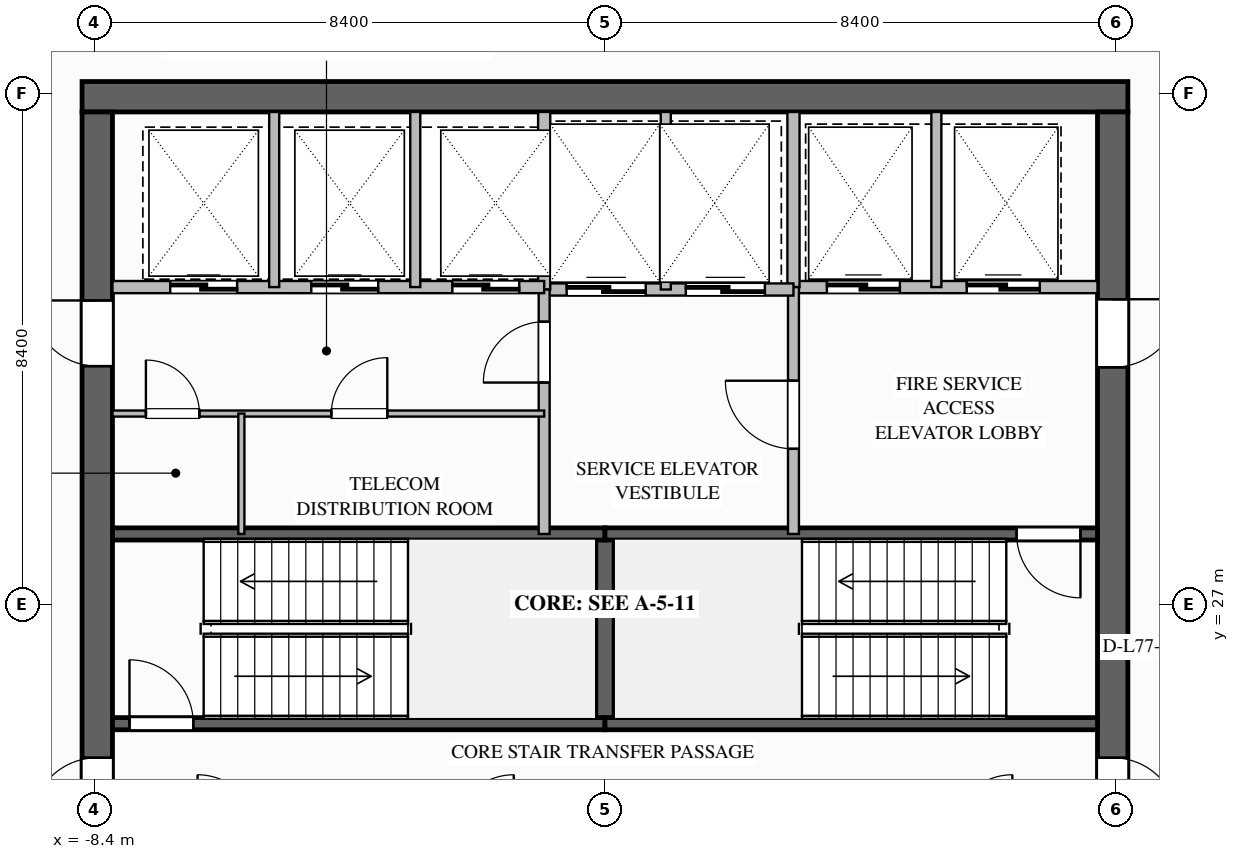
"""IFC4 building model, lengths in metres.
Left out: names, types, materials, properties, quantities, classifications, styles, units other than length and angle.
Written with IfcOpenShell. Run it as: python <this file> out.ifc"""

import sys

from ifc_helpers import new_model, si_unit, direction, frame, frame_2d, origin, place, context, subcontext, project, spatial, rectangle, extrude, element, fill, save


model = new_model("IFC4")
c1 = context("Model", 3, precision=1e-05, world=origin(), true_north=direction((0.0, 1.0)))
c2 = subcontext(c1, "Body", "Model", "MODEL_VIEW")
j1 = project(units=[si_unit("LENGTHUNIT", "METRE"), si_unit("PLANEANGLEUNIT", "RADIAN")], contexts=[c1])
p1 = place(None, origin())
s1 = spatial("IfcSite", under=j1, at=p1, CompositionType="ELEMENT")
p2 = place(p1, origin())
s2 = spatial("IfcBuilding", under=s1, at=p2, CompositionType="ELEMENT")
p3 = place(p2, frame((0.0, 0.0, 294.2)))
s3 = spatial("IfcBuildingStorey", under=s2, at=p3, CompositionType="ELEMENT", Elevation=294.2)
p4 = place(p3, frame((-8.6, 35.35, 0.0), z_axis=(0.0, 0.0, 1.0), x_axis=(1.0, 0.0, 0.0)))
e1 = element("IfcWall", 1, at=p4, inside=s3, PredefinedType="SHEAR", context=c2, shape_type="SweptSolid", body=[
    extrude(rectangle(XDim=17.2, YDim=0.5, at=frame_2d((8.6, 0.0))), origin(), (0.0, 0.0, 1.0), 4.4),
])
p5 = place(p3, frame((8.35, 35.1, 0.0), z_axis=(0.0, 0.0, 1.0), x_axis=(0.0, -1.0, 0.0)))
e2 = element("IfcWall", 2, at=p5, inside=s3, PredefinedType="SHEAR", context=c2, shape_type="SweptSolid", body=[
    extrude(rectangle(XDim=16.2, YDim=0.5, at=frame_2d((8.1, 0.0))), origin(), (0.0, 0.0, 1.0), 4.4),
])
p6 = place(p5, frame((3.08, 0.0, 0.0)))
e3 = element("IfcOpeningElement", 3, at=p6, cuts=e2, PredefinedType="OPENING", context=c2, shape_type="SweptSolid", body=[
    extrude(rectangle(XDim=1.12, YDim=2.1, at=frame_2d((0.56, 1.05))), frame((0.0, 0.26, 0.0), z_axis=(0.0, -1.0, 0.0), x_axis=(1.0, 0.0, 0.0)), (0.0, 0.0, 1.0), 0.52),
])
p7 = place(p5, frame((10.62, 0.0, 0.0)))
e4 = element("IfcOpeningElement", 4, at=p7, cuts=e2, PredefinedType="OPENING", context=c2, shape_type="SweptSolid", body=[
    extrude(rectangle(XDim=1.08, YDim=2.04, at=frame_2d((0.54, 1.02))), frame((0.0, 0.26, 0.0), z_axis=(0.0, -1.0, 0.0), x_axis=(1.0, 0.0, 0.0)), (0.0, 0.0, 1.0), 0.52),
])
p8 = place(p3, frame((-8.35, 18.9, 0.0), z_axis=(0.0, 0.0, 1.0), x_axis=(0.0, 1.0, 0.0)))
e5 = element("IfcWall", 5, at=p8, inside=s3, PredefinedType="SHEAR", context=c2, shape_type="SweptSolid", body=[
    extrude(rectangle(XDim=16.2, YDim=0.5, at=frame_2d((8.1, 0.0))), origin(), (0.0, 0.0, 1.0), 4.4),
])
p9 = place(p8, frame((12.02, 0.0, 0.0)))
e6 = element("IfcOpeningElement", 6, at=p9, cuts=e5, PredefinedType="OPENING", context=c2, shape_type="SweptSolid", body=[
    extrude(rectangle(XDim=1.08, YDim=2.04, at=frame_2d((0.54, 1.02))), frame((0.0, 0.26, 0.0), z_axis=(0.0, -1.0, 0.0), x_axis=(1.0, 0.0, 0.0)), (0.0, 0.0, 1.0), 0.52),
])
p10 = place(p8, frame((4.5, 0.0, 0.0)))
e7 = element("IfcOpeningElement", 7, at=p10, cuts=e5, PredefinedType="OPENING", context=c2, shape_type="SweptSolid", body=[
    extrude(rectangle(XDim=1.08, YDim=2.04, at=frame_2d((0.54, 1.02))), frame((0.0, 0.26, 0.0), z_axis=(0.0, -1.0, 0.0), x_axis=(1.0, 0.0, 0.0)), (0.0, 0.0, 1.0), 0.52),
])
p11 = place(p3, frame((0.0, 25.04, 0.0), z_axis=(0.0, 0.0, 1.0), x_axis=(0.0, 1.0, 0.0)))
e8 = element("IfcWall", 8, at=p11, inside=s3, PredefinedType="SOLIDWALL", context=c2, shape_type="SweptSolid", body=[
    extrude(rectangle(XDim=3.12, YDim=0.3, at=frame_2d((1.56, 0.0))), origin(), (0.0, 0.0, 1.0), 4.1),
])
p12 = place(p3, frame((-8.1, 25.04, 0.0), z_axis=(0.0, 0.0, 1.0), x_axis=(1.0, 0.0, 0.0)))
e9 = element("IfcWall", 9, at=p12, inside=s3, PredefinedType="SOLIDWALL", context=c2, shape_type="SweptSolid", body=[
    extrude(rectangle(XDim=8.1, YDim=0.2, at=frame_2d((4.05, 0.0))), origin(), (0.0, 0.0, 1.0), 4.1),
])
p13 = place(p12, frame((0.28, 0.0, 0.0)))
e10 = element("IfcOpeningElement", 10, at=p13, cuts=e9, PredefinedType="OPENING", context=c2, shape_type="SweptSolid", body=[
    extrude(rectangle(XDim=1.05, YDim=2.1, at=frame_2d((0.525, 1.05))), frame((0.0, 0.11, 0.0), z_axis=(0.0, -1.0, 0.0), x_axis=(1.0, 0.0, 0.0)), (0.0, 0.0, 1.0), 0.22),
])
for number, where, z_axis, x_axis in (
    (11, (-8.1, 28.16, 0.0), (0.0, 0.0, 1.0), (1.0, 0.0, 0.0)),
    (12, (0.0, 25.04, 0.0), (0.0, 0.0, 1.0), (1.0, 0.0, 0.0)),
):
    element("IfcWall", number, at=place(p3, frame(where, z_axis=z_axis, x_axis=x_axis)), inside=s3, PredefinedType="SOLIDWALL", context=c2, shape_type="SweptSolid", body=[
        extrude(rectangle(XDim=8.1, YDim=0.2, at=frame_2d((4.05, 0.0))), origin(), (0.0, 0.0, 1.0), 4.1),
    ])
p14 = place(p3, frame((8.1, 28.16, 0.0), z_axis=(0.0, 0.0, 1.0), x_axis=(-1.0, 0.0, 0.0)))
e13 = element("IfcWall", 13, at=p14, inside=s3, PredefinedType="SOLIDWALL", context=c2, shape_type="SweptSolid", body=[
    extrude(rectangle(XDim=8.1, YDim=0.2, at=frame_2d((4.05, 0.0))), origin(), (0.0, 0.0, 1.0), 4.1),
])
p15 = place(p14, frame((0.28, 0.0, 0.0)))
e14 = element("IfcOpeningElement", 14, at=p15, cuts=e13, PredefinedType="OPENING", context=c2, shape_type="SweptSolid", body=[
    extrude(rectangle(XDim=1.05, YDim=2.1, at=frame_2d((0.525, 1.05))), frame((0.0, 0.11, 0.0), z_axis=(0.0, -1.0, 0.0), x_axis=(1.0, 0.0, 0.0)), (0.0, 0.0, 1.0), 0.22),
])
p16 = place(p3, frame((3.1, 32.22, 0.0), z_axis=(0.0, 0.0, 1.0), x_axis=(1.0, 0.0, 0.0)))
e15 = element("IfcWall", 15, at=p16, inside=s3, PredefinedType="SOLIDWALL", context=c2, shape_type="SweptSolid", body=[
    extrude(rectangle(XDim=5.0, YDim=0.2, at=frame_2d((2.5, 0.0))), origin(), (0.0, 0.0, 1.0), 4.1),
])
p17 = place(p16, frame((0.55, 0.0, 0.0)))
e16 = element("IfcOpeningElement", 16, at=p17, cuts=e15, PredefinedType="OPENING", context=c2, shape_type="SweptSolid", body=[
    extrude(rectangle(XDim=1.2, YDim=2.2, at=frame_2d((0.6, 1.1))), frame((0.0, 0.11, 0.0), z_axis=(0.0, -1.0, 0.0), x_axis=(1.0, 0.0, 0.0)), (0.0, 0.0, 1.0), 0.22),
])
p18 = place(p16, frame((2.85, 0.0, 0.0)))
e17 = element("IfcOpeningElement", 17, at=p18, cuts=e15, PredefinedType="OPENING", context=c2, shape_type="SweptSolid", body=[
    extrude(rectangle(XDim=1.2, YDim=2.2, at=frame_2d((0.6, 1.1))), frame((0.0, 0.11, 0.0), z_axis=(0.0, -1.0, 0.0), x_axis=(1.0, 0.0, 0.0)), (0.0, 0.0, 1.0), 0.22),
])
p19 = place(p3, frame((3.1, 32.22, 0.0), z_axis=(0.0, 0.0, 1.0), x_axis=(0.0, 1.0, 0.0)))
e18 = element("IfcWall", 18, at=p19, inside=s3, PredefinedType="SOLIDWALL", context=c2, shape_type="SweptSolid", body=[
    extrude(rectangle(XDim=2.88, YDim=0.2, at=frame_2d((1.44, 0.0))), origin(), (0.0, 0.0, 1.0), 4.1),
])
p20 = place(p3, frame((5.45, 32.22, 0.0), z_axis=(0.0, 0.0, 1.0), x_axis=(0.0, 1.0, 0.0)))
e19 = element("IfcWall", 19, at=p20, inside=s3, PredefinedType="PARTITIONING", context=c2, shape_type="SweptSolid", body=[
    extrude(rectangle(XDim=2.88, YDim=0.165, at=frame_2d((1.44, 0.0))), origin(), (0.0, 0.0, 1.0), 4.1),
])
p21 = place(p3, frame((3.1, 28.16, 0.0), z_axis=(0.0, 0.0, 1.0), x_axis=(0.0, 1.0, 0.0)))
e20 = element("IfcWall", 20, at=p21, inside=s3, PredefinedType="SOLIDWALL", context=c2, shape_type="SweptSolid", body=[
    extrude(rectangle(XDim=4.06, YDim=0.18, at=frame_2d((2.03, 0.0))), origin(), (0.0, 0.0, 1.0), 4.1),
])
p22 = place(p21, frame((1.4, 0.0, 0.0)))
e21 = element("IfcOpeningElement", 21, at=p22, cuts=e20, PredefinedType="OPENING", context=c2, shape_type="SweptSolid", body=[
    extrude(rectangle(XDim=1.12, YDim=2.1, at=frame_2d((0.56, 1.05))), frame((0.0, 0.1, 0.0), z_axis=(0.0, -1.0, 0.0), x_axis=(1.0, 0.0, 0.0)), (0.0, 0.0, 1.0), 0.2),
])
p23 = place(p3, frame((-1.0, 32.18, 0.0), z_axis=(0.0, 0.0, 1.0), x_axis=(1.0, 0.0, 0.0)))
e22 = element("IfcWall", 22, at=p23, inside=s3, PredefinedType="SOLIDWALL", context=c2, shape_type="SweptSolid", body=[
    extrude(rectangle(XDim=4.1, YDim=0.2, at=frame_2d((2.05, 0.0))), origin(), (0.0, 0.0, 1.0), 4.1),
])
p24 = place(p23, frame((0.37, 0.0, 0.0)))
e23 = element("IfcOpeningElement", 23, at=p24, cuts=e22, PredefinedType="OPENING", context=c2, shape_type="SweptSolid", body=[
    extrude(rectangle(XDim=1.3, YDim=2.2, at=frame_2d((0.65, 1.1))), frame((0.0, 0.11, 0.0), z_axis=(0.0, -1.0, 0.0), x_axis=(1.0, 0.0, 0.0)), (0.0, 0.0, 1.0), 0.22),
])
p25 = place(p23, frame((2.33, 0.0, 0.0)))
e24 = element("IfcOpeningElement", 24, at=p25, cuts=e22, PredefinedType="OPENING", context=c2, shape_type="SweptSolid", body=[
    extrude(rectangle(XDim=1.3, YDim=2.2, at=frame_2d((0.65, 1.1))), frame((0.0, 0.11, 0.0), z_axis=(0.0, -1.0, 0.0), x_axis=(1.0, 0.0, 0.0)), (0.0, 0.0, 1.0), 0.22),
])
p26 = place(p3, frame((-1.0, 32.18, 0.0), z_axis=(0.0, 0.0, 1.0), x_axis=(0.0, 1.0, 0.0)))
e25 = element("IfcWall", 25, at=p26, inside=s3, PredefinedType="SOLIDWALL", context=c2, shape_type="SweptSolid", body=[
    extrude(rectangle(XDim=2.92, YDim=0.2, at=frame_2d((1.46, 0.0))), origin(), (0.0, 0.0, 1.0), 4.1),
])
p27 = place(p3, frame((1.0, 32.18, 0.0), z_axis=(0.0, 0.0, 1.0), x_axis=(0.0, 1.0, 0.0)))
e26 = element("IfcWall", 26, at=p27, inside=s3, PredefinedType="PARTITIONING", context=c2, shape_type="SweptSolid", body=[
    extrude(rectangle(XDim=2.92, YDim=0.165, at=frame_2d((1.46, 0.0))), origin(), (0.0, 0.0, 1.0), 4.1),
])
p28 = place(p3, frame((-1.0, 28.16, 0.0), z_axis=(0.0, 0.0, 1.0), x_axis=(0.0, 1.0, 0.0)))
e27 = element("IfcWall", 27, at=p28, inside=s3, PredefinedType="SOLIDWALL", context=c2, shape_type="SweptSolid", body=[
    extrude(rectangle(XDim=4.02, YDim=0.18, at=frame_2d((2.01, 0.0))), origin(), (0.0, 0.0, 1.0), 4.1),
])
p29 = place(p28, frame((2.49, 0.0, 0.0)))
e28 = element("IfcOpeningElement", 28, at=p29, cuts=e27, PredefinedType="OPENING", context=c2, shape_type="SweptSolid", body=[
    extrude(rectangle(XDim=1.0, YDim=2.1, at=frame_2d((0.5, 1.05))), frame((0.0, 0.1, 0.0), z_axis=(0.0, -1.0, 0.0), x_axis=(1.0, 0.0, 0.0)), (0.0, 0.0, 1.0), 0.2),
])
p30 = place(p3, frame((-8.1, 32.22, 0.0), z_axis=(0.0, 0.0, 1.0), x_axis=(1.0, 0.0, 0.0)))
e29 = element("IfcWall", 29, at=p30, inside=s3, PredefinedType="SOLIDWALL", context=c2, shape_type="SweptSolid", body=[
    extrude(rectangle(XDim=7.1, YDim=0.2, at=frame_2d((3.55, 0.0))), origin(), (0.0, 0.0, 1.0), 4.1),
])
p31 = place(p30, frame((0.95, 0.0, 0.0)))
e30 = element("IfcOpeningElement", 30, at=p31, cuts=e29, PredefinedType="OPENING", context=c2, shape_type="SweptSolid", body=[
    extrude(rectangle(XDim=1.1, YDim=2.2, at=frame_2d((0.55, 1.1))), frame((0.0, 0.11, 0.0), z_axis=(0.0, -1.0, 0.0), x_axis=(1.0, 0.0, 0.0)), (0.0, 0.0, 1.0), 0.22),
])
p32 = place(p30, frame((3.27, 0.0, 0.0)))
e31 = element("IfcOpeningElement", 31, at=p32, cuts=e29, PredefinedType="OPENING", context=c2, shape_type="SweptSolid", body=[
    extrude(rectangle(XDim=1.1, YDim=2.2, at=frame_2d((0.55, 1.1))), frame((0.0, 0.11, 0.0), z_axis=(0.0, -1.0, 0.0), x_axis=(1.0, 0.0, 0.0)), (0.0, 0.0, 1.0), 0.22),
])
p33 = place(p30, frame((5.59, 0.0, 0.0)))
e32 = element("IfcOpeningElement", 32, at=p33, cuts=e29, PredefinedType="OPENING", context=c2, shape_type="SweptSolid", body=[
    extrude(rectangle(XDim=1.1, YDim=2.2, at=frame_2d((0.55, 1.1))), frame((0.0, 0.11, 0.0), z_axis=(0.0, -1.0, 0.0), x_axis=(1.0, 0.0, 0.0)), (0.0, 0.0, 1.0), 0.22),
])
for number, where, z_axis, x_axis in (
    (33, (-5.44, 32.22, 0.0), (0.0, 0.0, 1.0), (0.0, 1.0, 0.0)),
    (34, (-3.12, 32.22, 0.0), (0.0, 0.0, 1.0), (0.0, 1.0, 0.0)),
):
    element("IfcWall", number, at=place(p3, frame(where, z_axis=z_axis, x_axis=x_axis)), inside=s3, PredefinedType="PARTITIONING", context=c2, shape_type="SweptSolid", body=[
        extrude(rectangle(XDim=2.88, YDim=0.165, at=frame_2d((1.44, 0.0))), origin(), (0.0, 0.0, 1.0), 4.1),
    ])
p34 = place(p3, frame((-8.1, 30.14, 0.0), z_axis=(0.0, 0.0, 1.0), x_axis=(1.0, 0.0, 0.0)))
e35 = element("IfcWall", 35, at=p34, inside=s3, PredefinedType="PARTITIONING", context=c2, shape_type="SweptSolid", body=[
    extrude(rectangle(XDim=7.1, YDim=0.1, at=frame_2d((3.55, 0.0))), origin(), (0.0, 0.0, 1.0), 4.1),
])
p35 = place(p34, frame((0.55, 0.0, 0.0)))
e36 = element("IfcOpeningElement", 36, at=p35, cuts=e35, PredefinedType="OPENING", context=c2, shape_type="SweptSolid", body=[
    extrude(rectangle(XDim=0.88, YDim=2.1, at=frame_2d((0.44, 1.05))), frame((0.0, 0.06, 0.0), z_axis=(0.0, -1.0, 0.0), x_axis=(1.0, 0.0, 0.0)), (0.0, 0.0, 1.0), 0.12),
])
p36 = place(p34, frame((3.6, 0.0, 0.0)))
e37 = element("IfcOpeningElement", 37, at=p36, cuts=e35, PredefinedType="OPENING", context=c2, shape_type="SweptSolid", body=[
    extrude(rectangle(XDim=0.92, YDim=2.1, at=frame_2d((0.46, 1.05))), frame((0.0, 0.06, 0.0), z_axis=(0.0, -1.0, 0.0), x_axis=(1.0, 0.0, 0.0)), (0.0, 0.0, 1.0), 0.12),
])
p37 = place(p3, frame((-5.98, 28.16, 0.0), z_axis=(0.0, 0.0, 1.0), x_axis=(0.0, 1.0, 0.0)))
e38 = element("IfcWall", 38, at=p37, inside=s3, PredefinedType="PARTITIONING", context=c2, shape_type="SweptSolid", body=[
    extrude(rectangle(XDim=1.98, YDim=0.1, at=frame_2d((0.99, 0.0))), origin(), (0.0, 0.0, 1.0), 4.1),
])
p38 = place(p13, origin())
e39 = element("IfcDoor", 39, at=p38, inside=s3, OperationType="SINGLE_SWING_LEFT", PredefinedType="DOOR", context=c2, shape_type="SweptSolid", body=[
    extrude(rectangle(XDim=1.05, YDim=2.1, at=frame_2d((0.525, 1.05))), frame((0.0, 0.025, 0.0), z_axis=(0.0, -1.0, 0.0), x_axis=(1.0, 0.0, 0.0)), (0.0, 0.0, 1.0), 0.05),
])
fill(e10, e39)
p39 = place(p15, origin())
e40 = element("IfcDoor", 40, at=p39, inside=s3, OperationType="SINGLE_SWING_LEFT", PredefinedType="DOOR", context=c2, shape_type="SweptSolid", body=[
    extrude(rectangle(XDim=1.05, YDim=2.1, at=frame_2d((0.525, 1.05))), frame((0.0, 0.025, 0.0), z_axis=(0.0, -1.0, 0.0), x_axis=(1.0, 0.0, 0.0)), (0.0, 0.0, 1.0), 0.05),
])
fill(e14, e40)
p40 = place(p17, origin())
e41 = element("IfcDoor", 41, at=p40, inside=s3, OperationType="SLIDING_TO_LEFT", PredefinedType="DOOR", context=c2, shape_type="SweptSolid", body=[
    extrude(rectangle(XDim=1.2, YDim=2.2, at=frame_2d((0.6, 1.1))), frame((0.0, 0.025, 0.0), z_axis=(0.0, -1.0, 0.0), x_axis=(1.0, 0.0, 0.0)), (0.0, 0.0, 1.0), 0.05),
])
fill(e16, e41)
p41 = place(p18, origin())
e42 = element("IfcDoor", 42, at=p41, inside=s3, OperationType="SLIDING_TO_LEFT", PredefinedType="DOOR", context=c2, shape_type="SweptSolid", body=[
    extrude(rectangle(XDim=1.2, YDim=2.2, at=frame_2d((0.6, 1.1))), frame((0.0, 0.025, 0.0), z_axis=(0.0, -1.0, 0.0), x_axis=(1.0, 0.0, 0.0)), (0.0, 0.0, 1.0), 0.05),
])
fill(e17, e42)
p42 = place(p22, origin())
e43 = element("IfcDoor", 43, at=p42, inside=s3, OperationType="SINGLE_SWING_RIGHT", PredefinedType="DOOR", context=c2, shape_type="SweptSolid", body=[
    extrude(rectangle(XDim=1.12, YDim=2.1, at=frame_2d((0.56, 1.05))), frame((0.0, 0.025, 0.0), z_axis=(0.0, -1.0, 0.0), x_axis=(1.0, 0.0, 0.0)), (0.0, 0.0, 1.0), 0.05),
])
fill(e21, e43)
p43 = place(p6, origin())
e44 = element("IfcDoor", 44, at=p43, inside=s3, OperationType="SINGLE_SWING_LEFT", PredefinedType="DOOR", context=c2, shape_type="SweptSolid", body=[
    extrude(rectangle(XDim=1.12, YDim=2.1, at=frame_2d((0.56, 1.05))), frame((0.0, 0.025, 0.0), z_axis=(0.0, -1.0, 0.0), x_axis=(1.0, 0.0, 0.0)), (0.0, 0.0, 1.0), 0.05),
])
fill(e3, e44)
p44 = place(p24, origin())
e45 = element("IfcDoor", 45, at=p44, inside=s3, OperationType="SLIDING_TO_LEFT", PredefinedType="DOOR", context=c2, shape_type="SweptSolid", body=[
    extrude(rectangle(XDim=1.3, YDim=2.2, at=frame_2d((0.65, 1.1))), frame((0.0, 0.025, 0.0), z_axis=(0.0, -1.0, 0.0), x_axis=(1.0, 0.0, 0.0)), (0.0, 0.0, 1.0), 0.05),
])
fill(e23, e45)
p45 = place(p25, origin())
e46 = element("IfcDoor", 46, at=p45, inside=s3, OperationType="SLIDING_TO_LEFT", PredefinedType="DOOR", context=c2, shape_type="SweptSolid", body=[
    extrude(rectangle(XDim=1.3, YDim=2.2, at=frame_2d((0.65, 1.1))), frame((0.0, 0.025, 0.0), z_axis=(0.0, -1.0, 0.0), x_axis=(1.0, 0.0, 0.0)), (0.0, 0.0, 1.0), 0.05),
])
fill(e24, e46)
p46 = place(p29, origin())
e47 = element("IfcDoor", 47, at=p46, inside=s3, OperationType="SINGLE_SWING_LEFT", PredefinedType="DOOR", context=c2, shape_type="SweptSolid", body=[
    extrude(rectangle(XDim=1.0, YDim=2.1, at=frame_2d((0.5, 1.05))), frame((0.0, 0.025, 0.0), z_axis=(0.0, -1.0, 0.0), x_axis=(1.0, 0.0, 0.0)), (0.0, 0.0, 1.0), 0.05),
])
fill(e28, e47)
p47 = place(p31, origin())
e48 = element("IfcDoor", 48, at=p47, inside=s3, OperationType="SLIDING_TO_LEFT", PredefinedType="DOOR", context=c2, shape_type="SweptSolid", body=[
    extrude(rectangle(XDim=1.1, YDim=2.2, at=frame_2d((0.55, 1.1))), frame((0.0, 0.025, 0.0), z_axis=(0.0, -1.0, 0.0), x_axis=(1.0, 0.0, 0.0)), (0.0, 0.0, 1.0), 0.05),
])
fill(e30, e48)
p48 = place(p32, origin())
e49 = element("IfcDoor", 49, at=p48, inside=s3, OperationType="SLIDING_TO_LEFT", PredefinedType="DOOR", context=c2, shape_type="SweptSolid", body=[
    extrude(rectangle(XDim=1.1, YDim=2.2, at=frame_2d((0.55, 1.1))), frame((0.0, 0.025, 0.0), z_axis=(0.0, -1.0, 0.0), x_axis=(1.0, 0.0, 0.0)), (0.0, 0.0, 1.0), 0.05),
])
fill(e31, e49)
p49 = place(p33, origin())
e50 = element("IfcDoor", 50, at=p49, inside=s3, OperationType="SLIDING_TO_LEFT", PredefinedType="DOOR", context=c2, shape_type="SweptSolid", body=[
    extrude(rectangle(XDim=1.1, YDim=2.2, at=frame_2d((0.55, 1.1))), frame((0.0, 0.025, 0.0), z_axis=(0.0, -1.0, 0.0), x_axis=(1.0, 0.0, 0.0)), (0.0, 0.0, 1.0), 0.05),
])
fill(e32, e50)
p50 = place(p9, origin())
e51 = element("IfcDoor", 51, at=p50, inside=s3, OperationType="SINGLE_SWING_RIGHT", PredefinedType="DOOR", context=c2, shape_type="SweptSolid", body=[
    extrude(rectangle(XDim=1.08, YDim=2.04, at=frame_2d((0.54, 1.02))), frame((0.0, 0.025, 0.0), z_axis=(0.0, -1.0, 0.0), x_axis=(1.0, 0.0, 0.0)), (0.0, 0.0, 1.0), 0.05),
])
fill(e6, e51)
p51 = place(p35, origin())
e52 = element("IfcDoor", 52, at=p51, inside=s3, OperationType="SINGLE_SWING_LEFT", PredefinedType="DOOR", context=c2, shape_type="SweptSolid", body=[
    extrude(rectangle(XDim=0.88, YDim=2.1, at=frame_2d((0.44, 1.05))), frame((0.0, 0.025, 0.0), z_axis=(0.0, -1.0, 0.0), x_axis=(1.0, 0.0, 0.0)), (0.0, 0.0, 1.0), 0.05),
])
fill(e36, e52)
p52 = place(p36, origin())
e53 = element("IfcDoor", 53, at=p52, inside=s3, OperationType="SINGLE_SWING_RIGHT", PredefinedType="DOOR", context=c2, shape_type="SweptSolid", body=[
    extrude(rectangle(XDim=0.92, YDim=2.1, at=frame_2d((0.46, 1.05))), frame((0.0, 0.025, 0.0), z_axis=(0.0, -1.0, 0.0), x_axis=(1.0, 0.0, 0.0)), (0.0, 0.0, 1.0), 0.05),
])
fill(e37, e53)
p53 = place(p10, origin())
e54 = element("IfcDoor", 54, at=p53, inside=s3, OperationType="SINGLE_SWING_LEFT", PredefinedType="DOOR", context=c2, shape_type="SweptSolid", body=[
    extrude(rectangle(XDim=1.08, YDim=2.04, at=frame_2d((0.54, 1.02))), frame((0.0, 0.025, 0.0), z_axis=(0.0, -1.0, 0.0), x_axis=(1.0, 0.0, 0.0)), (0.0, 0.0, 1.0), 0.05),
])
fill(e7, e54)
p54 = place(p7, origin())
e55 = element("IfcDoor", 55, at=p54, inside=s3, OperationType="SINGLE_SWING_RIGHT", PredefinedType="DOOR", context=c2, shape_type="SweptSolid", body=[
    extrude(rectangle(XDim=1.08, YDim=2.04, at=frame_2d((0.54, 1.02))), frame((0.0, 0.025, 0.0), z_axis=(0.0, -1.0, 0.0), x_axis=(1.0, 0.0, 0.0)), (0.0, 0.0, 1.0), 0.05),
])
fill(e4, e55)
save(model, sys.argv[1])
